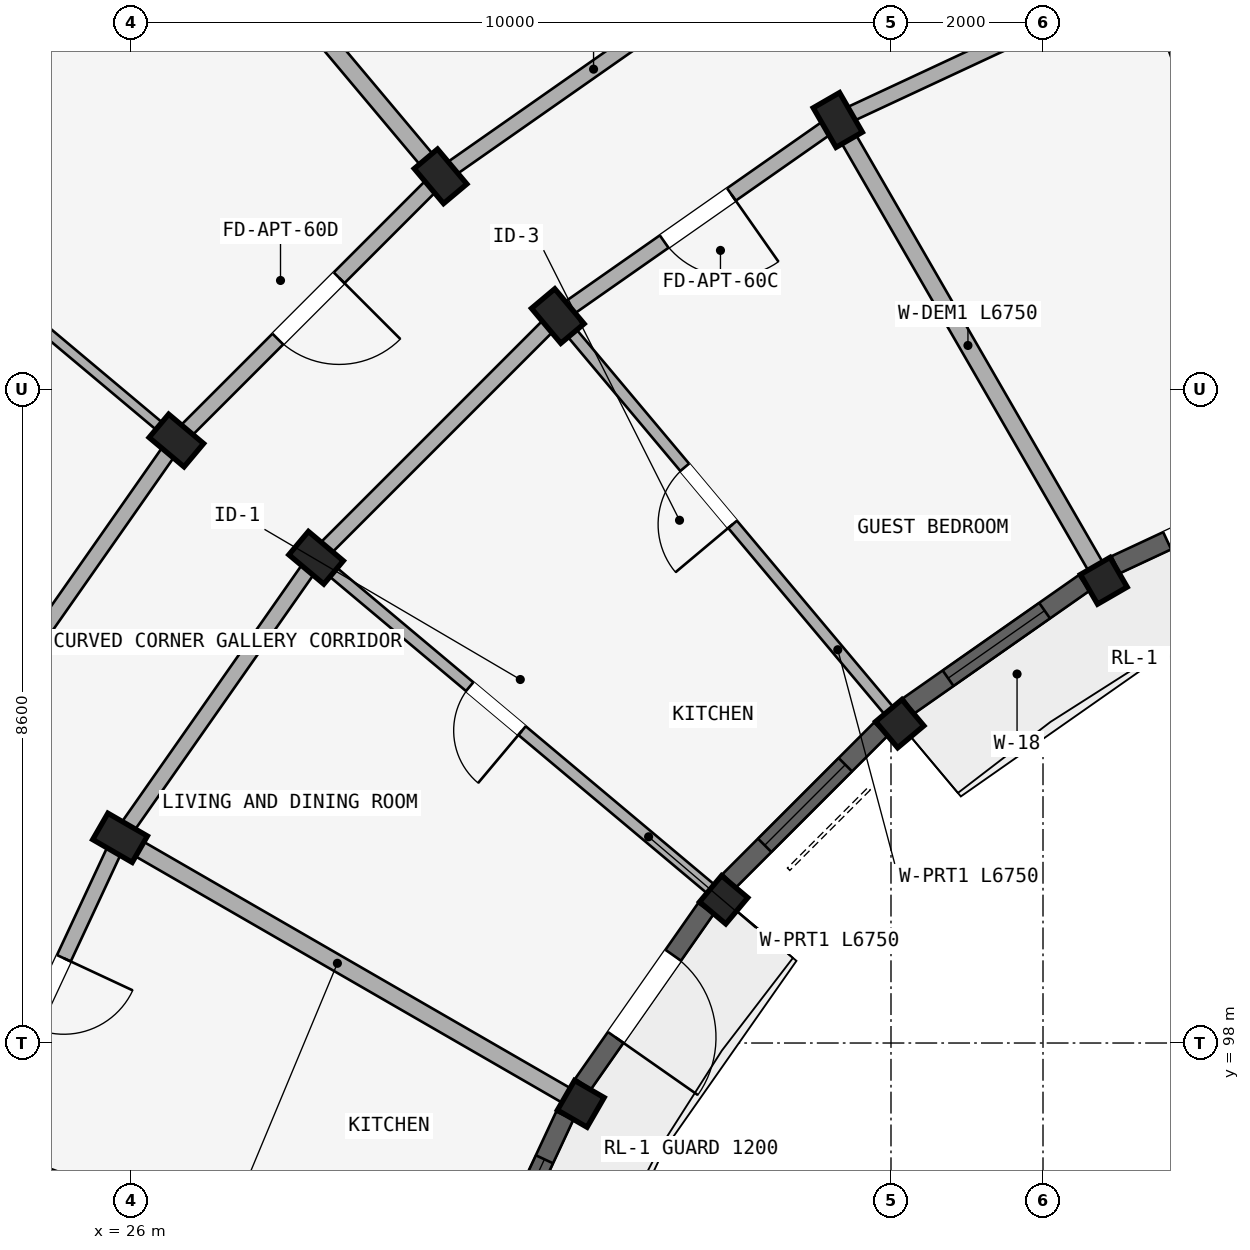
"""IFC4 building model, lengths in metres.
Left out: names, types, materials, properties, quantities, classifications, styles, units other than length and angle.
Written with IfcOpenShell. Run it as: python <this file> out.ifc"""

import sys

from ifc_helpers import new_model, si_unit, direction, frame, frame_2d, origin, origin_2d, place, context, subcontext, project, spatial, rectangle, extrude, element, fill, save


model = new_model("IFC4")
c1 = context("Model", 3, precision=1e-05, world=origin(), true_north=direction((0.0, 1.0)))
c2 = subcontext(c1, "Body", "Model", "MODEL_VIEW")
j1 = project(units=[si_unit("LENGTHUNIT", "METRE"), si_unit("PLANEANGLEUNIT", "RADIAN")], contexts=[c1])
p1 = place(None, origin())
s1 = spatial("IfcSite", under=j1, at=p1, CompositionType="ELEMENT")
p2 = place(p1, origin())
s2 = spatial("IfcBuilding", under=s1, at=p2, CompositionType="ELEMENT")
p3 = place(p2, frame((0.0, 0.0, 49.65)))
s3 = spatial("IfcBuildingStorey", under=s2, at=p3, CompositionType="ELEMENT", Elevation=49.65)
p4 = place(p3, frame((38.8, 104.081, 0.0), z_axis=(0.0, 0.0, 1.0), x_axis=(0.866025403784, 0.5, 0.0)))
e1 = element("IfcColumn", 1, at=p4, inside=s3, PredefinedType="COLUMN", context=c2, shape_type="SweptSolid", body=[
    extrude(rectangle(XDim=0.45, YDim=0.45, at=origin_2d()), origin(), (0.0, 0.0, 1.0), 2.91),
])
p5 = place(p3, frame((35.3, 110.144, 0.0), z_axis=(0.0, 0.0, 1.0), x_axis=(0.866025403784, 0.5, 0.0)))
e2 = element("IfcColumn", 2, at=p5, inside=s3, PredefinedType="COLUMN", context=c2, shape_type="SweptSolid", body=[
    extrude(rectangle(XDim=0.4, YDim=0.6, at=origin_2d()), origin(), (0.0, 0.0, 1.0), 2.91),
])
p6 = place(p3, frame((36.115, 102.202, 0.0), z_axis=(0.0, 0.0, 1.0), x_axis=(0.766044443119, 0.642787609687, 0.0)))
e3 = element("IfcColumn", 3, at=p6, inside=s3, PredefinedType="COLUMN", context=c2, shape_type="SweptSolid", body=[
    extrude(rectangle(XDim=0.45, YDim=0.45, at=origin_2d()), origin(), (0.0, 0.0, 1.0), 2.91),
])
for number, where, z_axis, x_axis in (
    (4, (31.616, 107.564, 0.0), (0.0, 0.0, 1.0), (0.766, 0.643, 0.0)),
    (5, (30.073, 109.402, 0.0), (0.0, 0.0, 1.0), (0.766, 0.643, 0.0)),
):
    element("IfcColumn", number, at=place(p3, frame(where, z_axis=z_axis, x_axis=x_axis)), inside=s3, PredefinedType="COLUMN", context=c2, shape_type="SweptSolid", body=[
        extrude(rectangle(XDim=0.4, YDim=0.6, at=origin_2d()), origin(), (0.0, 0.0, 1.0), 2.91),
    ])
p7 = place(p3, frame((33.798, 99.885, 0.0), z_axis=(0.0, 0.0, 1.0), x_axis=(0.642787609687, 0.766044443119, 0.0)))
e6 = element("IfcColumn", 6, at=p7, inside=s3, PredefinedType="COLUMN", context=c2, shape_type="SweptSolid", body=[
    extrude(rectangle(XDim=0.45, YDim=0.45, at=origin_2d()), origin(), (0.0, 0.0, 1.0), 2.91),
])
for number, where, z_axis, x_axis in (
    (7, (28.436, 104.384, 0.0), (0.0, 0.0, 1.0), (0.643, 0.766, 0.0)),
    (8, (26.598, 105.927, 0.0), (0.0, 0.0, 1.0), (0.643, 0.766, 0.0)),
):
    element("IfcColumn", number, at=place(p3, frame(where, z_axis=z_axis, x_axis=x_axis)), inside=s3, PredefinedType="COLUMN", context=c2, shape_type="SweptSolid", body=[
        extrude(rectangle(XDim=0.4, YDim=0.6, at=origin_2d()), origin(), (0.0, 0.0, 1.0), 2.91),
    ])
p8 = place(p3, frame((31.919, 97.2, 0.0), z_axis=(0.0, 0.0, 1.0), x_axis=(0.5, 0.866025403784, 0.0)))
e9 = element("IfcColumn", 9, at=p8, inside=s3, PredefinedType="COLUMN", context=c2, shape_type="SweptSolid", body=[
    extrude(rectangle(XDim=0.45, YDim=0.45, at=origin_2d()), origin(), (0.0, 0.0, 1.0), 2.91),
])
p9 = place(p3, frame((25.856, 100.7, 0.0), z_axis=(0.0, 0.0, 1.0), x_axis=(0.5, 0.866025403784, 0.0)))
e10 = element("IfcColumn", 10, at=p9, inside=s3, PredefinedType="COLUMN", context=c2, shape_type="SweptSolid", body=[
    extrude(rectangle(XDim=0.4, YDim=0.6, at=origin_2d()), origin(), (0.0, 0.0, 1.0), 2.91),
])
p10 = place(p3, frame((39.376, 112.044, 0.0), z_axis=(0.0, 0.0, 1.0), x_axis=(-0.906307919131, -0.422617978463, 0.0)))
e11 = element("IfcWall", 11, at=p10, inside=s3, PredefinedType="STANDARD", context=c2, shape_type="SweptSolid", body=[
    extrude(rectangle(XDim=4.497, YDim=0.2, at=frame_2d((2.249, 0.0))), origin(), (0.0, 0.0, 1.0), 2.352),
])
p11 = place(p3, frame((35.3, 110.144, 0.0), z_axis=(0.0, 0.0, 1.0), x_axis=(-0.819155404658, -0.573571637217, 0.0)))
e12 = element("IfcWall", 12, at=p11, inside=s3, PredefinedType="STANDARD", context=c2, shape_type="SweptSolid", body=[
    extrude(rectangle(XDim=4.497, YDim=0.2, at=frame_2d((2.249, 0.0))), origin(), (0.0, 0.0, 1.0), 2.352),
])
p12 = place(p11, frame((1.709, 0.0, 0.0)))
e13 = element("IfcOpeningElement", 13, at=p12, cuts=e12, PredefinedType="OPENING", context=c2, shape_type="SweptSolid", body=[
    extrude(rectangle(XDim=1.08, YDim=2.15, at=frame_2d((0.54, 1.075))), frame((0.0, 0.11, 0.0), z_axis=(0.0, -1.0, 0.0), x_axis=(1.0, 0.0, 0.0)), (0.0, 0.0, 1.0), 0.22),
])
p13 = place(p3, frame((34.1, 112.222, 0.0), z_axis=(0.0, 0.0, 1.0), x_axis=(-0.819140911474, -0.573592335331, 0.0)))
e14 = element("IfcWall", 14, at=p13, inside=s3, PredefinedType="STANDARD", context=c2, shape_type="SweptSolid", body=[
    extrude(rectangle(XDim=4.916, YDim=0.2, at=frame_2d((2.458, 0.0))), origin(), (0.0, 0.0, 1.0), 2.352),
])
p14 = place(p3, frame((31.616, 107.564, 0.0), z_axis=(0.0, 0.0, 1.0), x_axis=(-0.707106781187, -0.707106781187, 0.0)))
e15 = element("IfcWall", 15, at=p14, inside=s3, PredefinedType="STANDARD", context=c2, shape_type="SweptSolid", body=[
    extrude(rectangle(XDim=4.497, YDim=0.2, at=frame_2d((2.249, 0.0))), origin(), (0.0, 0.0, 1.0), 2.352),
])
p15 = place(p3, frame((30.073, 109.402, 0.0), z_axis=(0.0, 0.0, 1.0), x_axis=(-0.707106781187, -0.707106781187, 0.0)))
e16 = element("IfcWall", 16, at=p15, inside=s3, PredefinedType="STANDARD", context=c2, shape_type="SweptSolid", body=[
    extrude(rectangle(XDim=4.916, YDim=0.2, at=frame_2d((2.458, 0.0))), origin(), (0.0, 0.0, 1.0), 2.352),
])
p16 = place(p15, frame((1.888, 0.0, 0.0)))
e17 = element("IfcOpeningElement", 17, at=p16, cuts=e16, PredefinedType="OPENING", context=c2, shape_type="SweptSolid", body=[
    extrude(rectangle(XDim=1.14, YDim=2.15, at=frame_2d((0.57, 1.075))), frame((0.0, 0.11, 0.0), z_axis=(0.0, -1.0, 0.0), x_axis=(1.0, 0.0, 0.0)), (0.0, 0.0, 1.0), 0.22),
])
p17 = place(p3, frame((28.436, 104.384, 0.0), z_axis=(0.0, 0.0, 1.0), x_axis=(-0.573571637217, -0.819155404658, 0.0)))
e18 = element("IfcWall", 18, at=p17, inside=s3, PredefinedType="STANDARD", context=c2, shape_type="SweptSolid", body=[
    extrude(rectangle(XDim=4.497, YDim=0.2, at=frame_2d((2.249, 0.0))), origin(), (0.0, 0.0, 1.0), 2.352),
])
p18 = place(p3, frame((26.598, 105.927, 0.0), z_axis=(0.0, 0.0, 1.0), x_axis=(-0.573592335331, -0.819140911474, 0.0)))
e19 = element("IfcWall", 19, at=p18, inside=s3, PredefinedType="STANDARD", context=c2, shape_type="SweptSolid", body=[
    extrude(rectangle(XDim=4.916, YDim=0.2, at=frame_2d((2.458, 0.0))), origin(), (0.0, 0.0, 1.0), 2.352),
])
p19 = place(p3, frame((25.856, 100.7, 0.0), z_axis=(0.0, 0.0, 1.0), x_axis=(-0.422617978463, -0.906307919131, 0.0)))
e20 = element("IfcWall", 20, at=p19, inside=s3, PredefinedType="STANDARD", context=c2, shape_type="SweptSolid", body=[
    extrude(rectangle(XDim=4.497, YDim=0.2, at=frame_2d((2.249, 0.0))), origin(), (0.0, 0.0, 1.0), 2.352),
])
p20 = place(p19, frame((1.749, 0.0, 0.0)))
e21 = element("IfcOpeningElement", 21, at=p20, cuts=e20, PredefinedType="OPENING", context=c2, shape_type="SweptSolid", body=[
    extrude(rectangle(XDim=1.0, YDim=2.15, at=frame_2d((0.5, 1.075))), frame((0.0, 0.11, 0.0), z_axis=(0.0, -1.0, 0.0), x_axis=(1.0, 0.0, 0.0)), (0.0, 0.0, 1.0), 0.22),
])
p21 = place(p3, frame((41.702, 105.654, 0.0), z_axis=(0.0, 0.0, 1.0), x_axis=(-0.342010221662, 0.939696231917, 0.0)))
e22 = element("IfcWall", 22, at=p21, inside=s3, PredefinedType="PARTITIONING", context=c2, shape_type="SweptSolid", body=[
    extrude(rectangle(XDim=6.75, YDim=0.15, at=frame_2d((3.375, 0.0))), origin(), (0.0, 0.0, 1.0), 2.352),
])
p22 = place(p21, frame((3.262, 0.0, 0.0)))
e23 = element("IfcOpeningElement", 23, at=p22, cuts=e22, PredefinedType="OPENING", context=c2, shape_type="SweptSolid", body=[
    extrude(rectangle(XDim=0.9, YDim=2.1, at=frame_2d((0.45, 1.05))), frame((0.0, 0.085, 0.0), z_axis=(0.0, -1.0, 0.0), x_axis=(1.0, 0.0, 0.0)), (0.0, 0.0, 1.0), 0.17),
])
p23 = place(p3, frame((38.7, 104.254, 0.0), z_axis=(0.0, 0.0, 1.0), x_axis=(-0.499997969693, 0.866026575979, 0.0)))
e24 = element("IfcWall", 24, at=p23, inside=s3, PredefinedType="STANDARD", context=c2, shape_type="SweptSolid", body=[
    extrude(rectangle(XDim=6.75, YDim=0.22, at=frame_2d((3.375, 0.0))), origin(), (0.0, 0.0, 1.0), 2.352),
])
p24 = place(p3, frame((35.987, 102.355, 0.0), z_axis=(0.0, 0.0, 1.0), x_axis=(-0.642784846501, 0.766046761698, 0.0)))
e25 = element("IfcWall", 25, at=p24, inside=s3, PredefinedType="PARTITIONING", context=c2, shape_type="SweptSolid", body=[
    extrude(rectangle(XDim=6.75, YDim=0.15, at=frame_2d((3.375, 0.0))), origin(), (0.0, 0.0, 1.0), 2.352),
])
p25 = place(p24, frame((3.222, 0.0, 0.0)))
e26 = element("IfcOpeningElement", 26, at=p25, cuts=e25, PredefinedType="OPENING", context=c2, shape_type="SweptSolid", body=[
    extrude(rectangle(XDim=0.98, YDim=2.12, at=frame_2d((0.49, 1.06))), frame((0.0, 0.085, 0.0), z_axis=(0.0, -1.0, 0.0), x_axis=(1.0, 0.0, 0.0)), (0.0, 0.0, 1.0), 0.17),
])
p26 = place(p3, frame((30.009, 109.479, 0.0), z_axis=(0.0, 0.0, 1.0), x_axis=(-0.642771313427, 0.766058117009, 0.0)))
e27 = element("IfcWall", 27, at=p26, inside=s3, PredefinedType="STANDARD", context=c2, shape_type="SweptSolid", body=[
    extrude(rectangle(XDim=6.22, YDim=0.22, at=frame_2d((3.11, 0.0))), origin(), (0.0, 0.0, 1.0), 2.352),
])
p27 = place(p3, frame((33.645, 100.013, 0.0), z_axis=(0.0, 0.0, 1.0), x_axis=(-0.766046761698, 0.642784846501, 0.0)))
e28 = element("IfcWall", 28, at=p27, inside=s3, PredefinedType="PARTITIONING", context=c2, shape_type="SweptSolid", body=[
    extrude(rectangle(XDim=6.75, YDim=0.15, at=frame_2d((3.375, 0.0))), origin(), (0.0, 0.0, 1.0), 2.352),
])
p28 = place(p27, frame((3.262, 0.0, 0.0)))
e29 = element("IfcOpeningElement", 29, at=p28, cuts=e28, PredefinedType="OPENING", context=c2, shape_type="SweptSolid", body=[
    extrude(rectangle(XDim=0.9, YDim=2.1, at=frame_2d((0.45, 1.05))), frame((0.0, 0.085, 0.0), z_axis=(0.0, -1.0, 0.0), x_axis=(1.0, 0.0, 0.0)), (0.0, 0.0, 1.0), 0.17),
])
p29 = place(p3, frame((26.521, 105.991, 0.0), z_axis=(0.0, 0.0, 1.0), x_axis=(-0.766058117009, 0.642771313427, 0.0)))
e30 = element("IfcWall", 30, at=p29, inside=s3, PredefinedType="PARTITIONING", context=c2, shape_type="SweptSolid", body=[
    extrude(rectangle(XDim=6.22, YDim=0.125, at=frame_2d((3.11, 0.0))), origin(), (0.0, 0.0, 1.0), 2.352),
])
p30 = place(p29, frame((4.45, 0.0, 0.0)))
e31 = element("IfcOpeningElement", 31, at=p30, cuts=e30, PredefinedType="OPENING", context=c2, shape_type="SweptSolid", body=[
    extrude(rectangle(XDim=0.8, YDim=2.1, at=frame_2d((0.4, 1.05))), frame((0.0, 0.073, 0.0), z_axis=(0.0, -1.0, 0.0), x_axis=(1.0, 0.0, 0.0)), (0.0, 0.0, 1.0), 0.145),
])
p31 = place(p3, frame((31.746, 97.3, 0.0), z_axis=(0.0, 0.0, 1.0), x_axis=(-0.866026575979, 0.499997969693, 0.0)))
e32 = element("IfcWall", 32, at=p31, inside=s3, PredefinedType="STANDARD", context=c2, shape_type="SweptSolid", body=[
    extrude(rectangle(XDim=6.75, YDim=0.22, at=frame_2d((3.375, 0.0))), origin(), (0.0, 0.0, 1.0), 2.352),
])
p32 = place(p3, frame((30.346, 94.298, 0.0), z_axis=(0.0, 0.0, 1.0), x_axis=(-0.939696231917, 0.342010221662, 0.0)))
e33 = element("IfcWall", 33, at=p32, inside=s3, PredefinedType="PARTITIONING", context=c2, shape_type="SweptSolid", body=[
    extrude(rectangle(XDim=6.75, YDim=0.15, at=frame_2d((3.375, 0.0))), origin(), (0.0, 0.0, 1.0), 2.352),
])
p33 = place(p32, frame((3.222, 0.0, 0.0)))
e34 = element("IfcOpeningElement", 34, at=p33, cuts=e33, PredefinedType="OPENING", context=c2, shape_type="SweptSolid", body=[
    extrude(rectangle(XDim=0.98, YDim=2.12, at=frame_2d((0.49, 1.06))), frame((0.0, 0.085, 0.0), z_axis=(0.0, -1.0, 0.0), x_axis=(1.0, 0.0, 0.0)), (0.0, 0.0, 1.0), 0.17),
])
p34 = place(p3, frame((25.707, 114.157, 0.0), z_axis=(0.0, 0.0, 1.0), x_axis=(-0.707106781187, -0.707106781187, 0.0)))
e35 = element("IfcWall", 35, at=p34, inside=s3, PredefinedType="STANDARD", context=c2, shape_type="SweptSolid", body=[
    extrude(rectangle(XDim=5.465, YDim=0.25, at=frame_2d((2.732, 0.0))), origin(), (0.0, 0.0, 1.0), 2.352),
])
p35 = place(p34, frame((3.432, 0.0, 0.402)))
e36 = element("IfcOpeningElement", 36, at=p35, cuts=e35, PredefinedType="OPENING", context=c2, shape_type="SweptSolid", body=[
    extrude(rectangle(XDim=1.2, YDim=1.5, at=frame_2d((0.6, 0.75))), frame((0.0, 0.135, 0.0), z_axis=(0.0, -1.0, 0.0), x_axis=(1.0, 0.0, 0.0)), (0.0, 0.0, 1.0), 0.27),
])
p36 = place(p34, frame((1.283, 0.0, 0.0)))
e37 = element("IfcOpeningElement", 37, at=p36, cuts=e35, PredefinedType="OPENING", context=c2, shape_type="SweptSolid", body=[
    extrude(rectangle(XDim=1.26, YDim=2.15, at=frame_2d((0.63, 1.075))), frame((0.0, 0.135, 0.0), z_axis=(0.0, -1.0, 0.0), x_axis=(1.0, 0.0, 0.0)), (0.0, 0.0, 1.0), 0.27),
])
p37 = place(p3, frame((41.51, 105.483, 0.0), z_axis=(0.0, 0.0, 1.0), x_axis=(-0.906284857185, -0.422667431484, 0.0)))
e38 = element("IfcWall", 38, at=p37, inside=s3, PredefinedType="STANDARD", context=c2, shape_type="SweptSolid", body=[
    extrude(rectangle(XDim=2.82, YDim=0.25, at=frame_2d((1.41, 0.0))), origin(), (0.0, 0.0, 1.0), 2.402),
])
p38 = place(p37, frame((0.75, 0.0, 0.0)))
e39 = element("IfcOpeningElement", 39, at=p38, cuts=e38, PredefinedType="OPENING", context=c2, shape_type="SweptSolid", body=[
    extrude(rectangle(XDim=1.32, YDim=2.15, at=frame_2d((0.66, 1.075))), frame((0.0, 0.135, 0.0), z_axis=(0.0, -1.0, 0.0), x_axis=(1.0, 0.0, 0.0)), (0.0, 0.0, 1.0), 0.27),
])
p39 = place(p3, frame((38.541, 104.053, 0.0), z_axis=(0.0, 0.0, 1.0), x_axis=(-0.819154644592, -0.573572722716, 0.0)))
e40 = element("IfcWall", 40, at=p39, inside=s3, PredefinedType="STANDARD", context=c2, shape_type="SweptSolid", body=[
    extrude(rectangle(XDim=2.82, YDim=0.25, at=frame_2d((1.41, 0.0))), origin(), (0.0, 0.0, 1.0), 2.402),
])
p40 = place(p39, frame((0.635, 0.0, 0.602)))
e41 = element("IfcOpeningElement", 41, at=p40, cuts=e40, PredefinedType="OPENING", context=c2, shape_type="SweptSolid", body=[
    extrude(rectangle(XDim=1.55, YDim=1.6, at=frame_2d((0.775, 0.8))), frame((0.0, 0.135, 0.0), z_axis=(0.0, -1.0, 0.0), x_axis=(1.0, 0.0, 0.0)), (0.0, 0.0, 1.0), 0.27),
])
p41 = place(p3, frame((35.866, 102.128, 0.0), z_axis=(0.0, 0.0, 1.0), x_axis=(-0.707106781187, -0.707106781187, 0.0)))
e42 = element("IfcWall", 42, at=p41, inside=s3, PredefinedType="STANDARD", context=c2, shape_type="SweptSolid", body=[
    extrude(rectangle(XDim=2.82, YDim=0.25, at=frame_2d((1.41, 0.0))), origin(), (0.0, 0.0, 1.0), 2.402),
])
p42 = place(p41, frame((0.66, 0.0, 0.552)))
e43 = element("IfcOpeningElement", 43, at=p42, cuts=e42, PredefinedType="OPENING", context=c2, shape_type="SweptSolid", body=[
    extrude(rectangle(XDim=1.5, YDim=1.65, at=frame_2d((0.75, 0.825))), frame((0.0, 0.135, 0.0), z_axis=(0.0, -1.0, 0.0), x_axis=(1.0, 0.0, 0.0)), (0.0, 0.0, 1.0), 0.27),
])
p43 = place(p3, frame((33.565, 99.769, 0.0), z_axis=(0.0, 0.0, 1.0), x_axis=(-0.573572722716, -0.819154644592, 0.0)))
e44 = element("IfcWall", 44, at=p43, inside=s3, PredefinedType="STANDARD", context=c2, shape_type="SweptSolid", body=[
    extrude(rectangle(XDim=2.82, YDim=0.25, at=frame_2d((1.41, 0.0))), origin(), (0.0, 0.0, 1.0), 2.402),
])
p44 = place(p43, frame((0.75, 0.0, 0.0)))
e45 = element("IfcOpeningElement", 45, at=p44, cuts=e44, PredefinedType="OPENING", context=c2, shape_type="SweptSolid", body=[
    extrude(rectangle(XDim=1.32, YDim=2.15, at=frame_2d((0.66, 1.075))), frame((0.0, 0.135, 0.0), z_axis=(0.0, -1.0, 0.0), x_axis=(1.0, 0.0, 0.0)), (0.0, 0.0, 1.0), 0.27),
])
p45 = place(p3, frame((31.709, 97.046, 0.0), z_axis=(0.0, 0.0, 1.0), x_axis=(-0.422667431484, -0.906284857185, 0.0)))
e46 = element("IfcWall", 46, at=p45, inside=s3, PredefinedType="STANDARD", context=c2, shape_type="SweptSolid", body=[
    extrude(rectangle(XDim=2.82, YDim=0.25, at=frame_2d((1.41, 0.0))), origin(), (0.0, 0.0, 1.0), 2.402),
])
p46 = place(p45, frame((0.635, 0.0, 0.602)))
e47 = element("IfcOpeningElement", 47, at=p46, cuts=e46, PredefinedType="OPENING", context=c2, shape_type="SweptSolid", body=[
    extrude(rectangle(XDim=1.55, YDim=1.6, at=frame_2d((0.775, 0.8))), frame((0.0, 0.135, 0.0), z_axis=(0.0, -1.0, 0.0), x_axis=(1.0, 0.0, 0.0)), (0.0, 0.0, 1.0), 0.27),
])
p47 = place(p40, origin())
e48 = element("IfcWindow", 48, at=p47, inside=s3, PartitioningType="DOUBLE_PANEL_VERTICAL", PredefinedType="WINDOW", context=c2, shape_type="SweptSolid", body=[
    extrude(rectangle(XDim=1.55, YDim=1.6, at=frame_2d((0.775, 0.8))), frame((0.0, 0.03, 0.0), z_axis=(0.0, -1.0, 0.0), x_axis=(1.0, 0.0, 0.0)), (0.0, 0.0, 1.0), 0.06),
])
fill(e41, e48)
p48 = place(p42, origin())
e49 = element("IfcWindow", 49, at=p48, inside=s3, PartitioningType="DOUBLE_PANEL_VERTICAL", PredefinedType="WINDOW", context=c2, shape_type="SweptSolid", body=[
    extrude(rectangle(XDim=1.5, YDim=1.65, at=frame_2d((0.75, 0.825))), frame((0.0, 0.03, 0.0), z_axis=(0.0, -1.0, 0.0), x_axis=(1.0, 0.0, 0.0)), (0.0, 0.0, 1.0), 0.06),
])
fill(e43, e49)
p49 = place(p46, origin())
e50 = element("IfcWindow", 50, at=p49, inside=s3, PartitioningType="DOUBLE_PANEL_VERTICAL", PredefinedType="WINDOW", context=c2, shape_type="SweptSolid", body=[
    extrude(rectangle(XDim=1.55, YDim=1.6, at=frame_2d((0.775, 0.8))), frame((0.0, 0.03, 0.0), z_axis=(0.0, -1.0, 0.0), x_axis=(1.0, 0.0, 0.0)), (0.0, 0.0, 1.0), 0.06),
])
fill(e47, e50)
p50 = place(p25, frame((0.98, 0.0, 0.0), z_axis=(0.0, 0.0, 1.0), x_axis=(-1.0, 0.0, 0.0)))
e51 = element("IfcDoor", 51, at=p50, inside=s3, OperationType="SINGLE_SWING_RIGHT", PredefinedType="DOOR", context=c2, shape_type="SweptSolid", body=[
    extrude(rectangle(XDim=0.98, YDim=2.12, at=frame_2d((0.49, 1.06))), frame((0.0, 0.025, 0.0), z_axis=(0.0, -1.0, 0.0), x_axis=(1.0, 0.0, 0.0)), (0.0, 0.0, 1.0), 0.05),
])
fill(e26, e51)
p51 = place(p28, origin())
e52 = element("IfcDoor", 52, at=p51, inside=s3, OperationType="SINGLE_SWING_LEFT", PredefinedType="DOOR", context=c2, shape_type="SweptSolid", body=[
    extrude(rectangle(XDim=0.9, YDim=2.1, at=frame_2d((0.45, 1.05))), frame((0.0, 0.025, 0.0), z_axis=(0.0, -1.0, 0.0), x_axis=(1.0, 0.0, 0.0)), (0.0, 0.0, 1.0), 0.05),
])
fill(e29, e52)
p52 = place(p16, origin())
e53 = element("IfcDoor", 53, at=p52, inside=s3, OperationType="SINGLE_SWING_LEFT", PredefinedType="DOOR", context=c2, shape_type="SweptSolid", body=[
    extrude(rectangle(XDim=1.14, YDim=2.15, at=frame_2d((0.57, 1.075))), frame((0.0, 0.025, 0.0), z_axis=(0.0, -1.0, 0.0), x_axis=(1.0, 0.0, 0.0)), (0.0, 0.0, 1.0), 0.05),
])
fill(e17, e53)
p53 = place(p12, frame((1.08, 0.0, 0.0), z_axis=(0.0, 0.0, 1.0), x_axis=(-1.0, 0.0, 0.0)))
e54 = element("IfcDoor", 54, at=p53, inside=s3, OperationType="SINGLE_SWING_RIGHT", PredefinedType="DOOR", context=c2, shape_type="SweptSolid", body=[
    extrude(rectangle(XDim=1.08, YDim=2.15, at=frame_2d((0.54, 1.075))), frame((0.0, 0.025, 0.0), z_axis=(0.0, -1.0, 0.0), x_axis=(1.0, 0.0, 0.0)), (0.0, 0.0, 1.0), 0.05),
])
fill(e13, e54)
p54 = place(p20, origin())
e55 = element("IfcDoor", 55, at=p54, inside=s3, OperationType="SINGLE_SWING_LEFT", PredefinedType="DOOR", context=c2, shape_type="SweptSolid", body=[
    extrude(rectangle(XDim=1.0, YDim=2.15, at=frame_2d((0.5, 1.075))), frame((0.0, 0.025, 0.0), z_axis=(0.0, -1.0, 0.0), x_axis=(1.0, 0.0, 0.0)), (0.0, 0.0, 1.0), 0.05),
])
fill(e21, e55)
p55 = place(p38, origin())
e56 = element("IfcDoor", 56, at=p55, inside=s3, OperationType="SINGLE_SWING_LEFT", PredefinedType="DOOR", context=c2, shape_type="SweptSolid", body=[
    extrude(rectangle(XDim=1.32, YDim=2.15, at=frame_2d((0.66, 1.075))), frame((0.0, 0.025, 0.0), z_axis=(0.0, -1.0, 0.0), x_axis=(1.0, 0.0, 0.0)), (0.0, 0.0, 1.0), 0.05),
])
fill(e39, e56)
p56 = place(p44, origin())
e57 = element("IfcDoor", 57, at=p56, inside=s3, OperationType="SINGLE_SWING_RIGHT", PredefinedType="DOOR", context=c2, shape_type="SweptSolid", body=[
    extrude(rectangle(XDim=1.32, YDim=2.15, at=frame_2d((0.66, 1.075))), frame((0.0, 0.025, 0.0), z_axis=(0.0, -1.0, 0.0), x_axis=(1.0, 0.0, 0.0)), (0.0, 0.0, 1.0), 0.05),
])
fill(e45, e57)
save(model, sys.argv[1])
